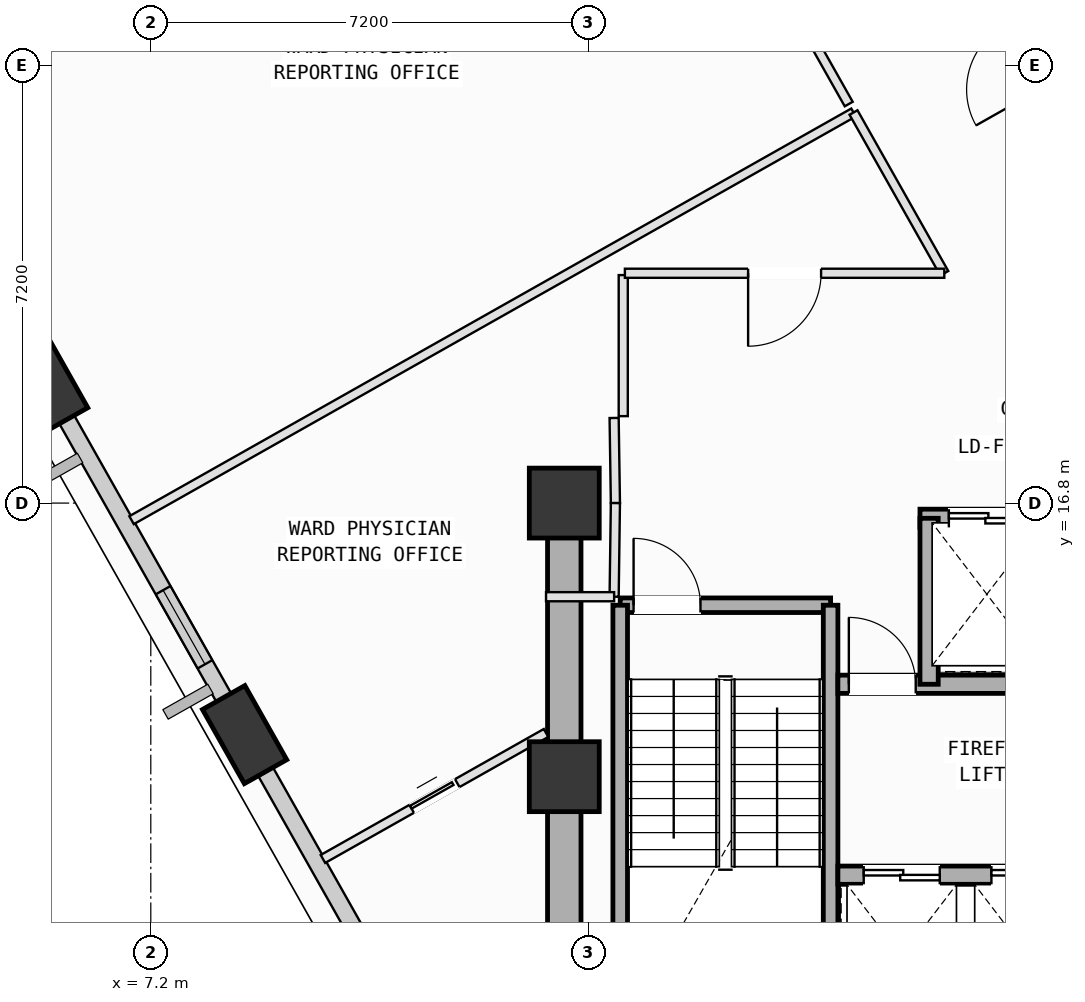
"""IFC4 building model, lengths in metres.
Left out: names, types, materials, properties, quantities, classifications, styles, units other than length and angle.
Written with IfcOpenShell. Run it as: python <this file> out.ifc"""

import sys

from ifc_helpers import new_model, si_unit, direction, frame, frame_2d, origin, origin_2d, place, context, subcontext, project, spatial, rectangle, extrude, element, fill, save


model = new_model("IFC4")
c1 = context("Model", 3, precision=1e-05, world=origin(), true_north=direction((0.0, 1.0)))
c2 = subcontext(c1, "Body", "Model", "MODEL_VIEW")
j1 = project(units=[si_unit("LENGTHUNIT", "METRE"), si_unit("PLANEANGLEUNIT", "RADIAN")], contexts=[c1])
p1 = place(None, origin())
s1 = spatial("IfcSite", under=j1, at=p1, CompositionType="ELEMENT")
p2 = place(p1, origin())
s2 = spatial("IfcBuilding", under=s1, at=p2, CompositionType="ELEMENT")
p3 = place(p2, frame((0.0, 0.0, 149.8)))
s3 = spatial("IfcBuildingStorey", under=s2, at=p3, CompositionType="ELEMENT", Elevation=149.8)
for number, where, z_axis, x_axis in (
    (1, (14.0, 12.3, 0.0), (0.0, 0.0, 1.0), (1.0, 0.0, 0.0)),
    (2, (14.0, 16.8, 0.0), (0.0, 0.0, 1.0), (1.0, 0.0, 0.0)),
):
    element("IfcColumn", number, at=place(p3, frame(where, z_axis=z_axis, x_axis=x_axis)), inside=s3, PredefinedType="COLUMN", context=c2, shape_type="SweptSolid", body=[
        extrude(rectangle(XDim=1.15, YDim=1.15, at=origin_2d()), origin(), (0.0, 0.0, 1.0), 4.0),
    ])
p4 = place(p3, frame((5.471, 18.781, 0.098), z_axis=(0.025670958189, -0.115612547775, 0.992962607908), x_axis=(-0.667400379772, 0.737524132822, 0.103125586472)))
e3 = element("IfcColumn", 3, at=p4, inside=s3, PredefinedType="COLUMN", context=c2, shape_type="SweptSolid", body=[
    extrude(rectangle(XDim=1.4, YDim=0.8, at=origin_2d()), origin(), (0.0, 0.0, 1.0), 3.928),
])
p5 = place(p3, frame((8.743, 12.992, 0.094), z_axis=(0.04945429726, -0.101952891713, 0.993559198213), x_axis=(-0.819960830844, 0.563851045212, 0.098672360339)))
e4 = element("IfcColumn", 4, at=p5, inside=s3, PredefinedType="COLUMN", context=c2, shape_type="SweptSolid", body=[
    extrude(rectangle(XDim=1.4, YDim=0.8, at=origin_2d()), origin(), (0.0, 0.0, 1.0), 3.93),
])
p6 = place(p3, frame((8.606, 13.236, 0.0), z_axis=(0.0, 0.0, 1.0), x_axis=(-0.491646579906, 0.870794832591, 0.0)))
e5 = element("IfcWall", 5, at=p6, inside=s3, PredefinedType="SOLIDWALL", context=c2, shape_type="SweptSolid", body=[
    extrude(rectangle(XDim=5.662, YDim=0.28, at=frame_2d((2.831, 0.0))), origin(), (0.0, 0.0, 1.0), 3.165),
])
p7 = place(p6, frame((1.048, 0.0, 0.75)))
e6 = element("IfcOpeningElement", 6, at=p7, cuts=e5, PredefinedType="OPENING", context=c2, shape_type="SweptSolid", body=[
    extrude(rectangle(XDim=1.4, YDim=1.85, at=frame_2d((0.7, 0.925))), frame((0.0, 0.15, 0.0), z_axis=(0.0, -1.0, 0.0), x_axis=(1.0, 0.0, 0.0)), (0.0, 0.0, 1.0), 0.3),
])
p8 = place(p3, frame((12.713, 5.962, 0.0), z_axis=(0.0, 0.0, 1.0), x_axis=(-0.491677941707, 0.870777125123, 0.0)))
e7 = element("IfcWall", 7, at=p8, inside=s3, PredefinedType="SOLIDWALL", context=c2, shape_type="SweptSolid", body=[
    extrude(rectangle(XDim=7.36, YDim=0.28, at=frame_2d((3.68, 0.0))), origin(), (0.0, 0.0, 1.0), 3.165),
])
p9 = place(p8, frame((1.825, 0.0, 0.75)))
e8 = element("IfcOpeningElement", 8, at=p9, cuts=e7, PredefinedType="OPENING", context=c2, shape_type="SweptSolid", body=[
    extrude(rectangle(XDim=1.8, YDim=2.05, at=frame_2d((0.9, 1.025))), frame((0.0, 0.15, 0.0), z_axis=(0.0, -1.0, 0.0), x_axis=(1.0, 0.0, 0.0)), (0.0, 0.0, 1.0), 0.3),
])
p10 = place(p3, frame((14.92, 15.12, 0.0), z_axis=(0.0, 0.0, 1.0), x_axis=(1.0, 0.0, 0.0)))
e9 = element("IfcWall", 9, at=p10, inside=s3, PredefinedType="SOLIDWALL", context=c2, shape_type="SweptSolid", body=[
    extrude(rectangle(XDim=3.46, YDim=0.24, at=frame_2d((1.73, 0.0))), origin(), (0.0, 0.0, 1.0), 3.78),
])
p11 = place(p10, frame((0.22, 0.0, 0.0)))
e10 = element("IfcOpeningElement", 10, at=p11, cuts=e9, PredefinedType="OPENING", context=c2, shape_type="SweptSolid", body=[
    extrude(rectangle(XDim=1.1, YDim=2.15, at=frame_2d((0.55, 1.075))), frame((0.0, 0.13, 0.0), z_axis=(0.0, -1.0, 0.0), x_axis=(1.0, 0.0, 0.0)), (0.0, 0.0, 1.0), 0.26),
])
for number, where, z_axis, x_axis in (
    (11, (18.38, 15.12, 0.0), (0.0, 0.0, 1.0), (0.0, -1.0, 0.0)),
    (12, (14.92, 8.075, 0.0), (0.0, 0.0, 1.0), (0.0, 1.0, 0.0)),
):
    element("IfcWall", number, at=place(p3, frame(where, z_axis=z_axis, x_axis=x_axis)), inside=s3, PredefinedType="SOLIDWALL", context=c2, shape_type="SweptSolid", body=[
        extrude(rectangle(XDim=7.045, YDim=0.24, at=frame_2d((3.522, 0.0))), origin(), (0.0, 0.0, 1.0), 3.78),
    ])
p12 = place(p3, frame((14.0, 16.8, 0.0), z_axis=(0.0, 0.0, 1.0), x_axis=(0.0, -1.0, 0.0)))
e13 = element("IfcWall", 13, at=p12, inside=s3, PredefinedType="SHEAR", context=c2, shape_type="SweptSolid", body=[
    extrude(rectangle(XDim=9.0, YDim=0.55, at=frame_2d((4.5, 0.0))), origin(), (0.0, 0.0, 1.0), 3.78),
])
p13 = place(p3, frame((19.85, 16.55, 0.0), z_axis=(0.0, 0.0, 1.0), x_axis=(1.0, 0.0, 0.0)))
e14 = element("IfcWall", 14, at=p13, inside=s3, PredefinedType="SOLIDWALL", context=c2, shape_type="SweptSolid", body=[
    extrude(rectangle(XDim=4.375, YDim=0.3, at=frame_2d((2.188, 0.0))), origin(), (0.0, 0.0, 1.0), 3.78),
])
p14 = place(p13, frame((0.475, 0.0, 0.0)))
e15 = element("IfcOpeningElement", 15, at=p14, cuts=e14, PredefinedType="OPENING", context=c2, shape_type="SweptSolid", body=[
    extrude(rectangle(XDim=1.25, YDim=2.18, at=frame_2d((0.625, 1.09))), frame((0.0, 0.16, 0.0), z_axis=(0.0, -1.0, 0.0), x_axis=(1.0, 0.0, 0.0)), (0.0, 0.0, 1.0), 0.32),
])
p15 = place(p13, frame((2.49, 0.0, 0.0)))
e16 = element("IfcOpeningElement", 16, at=p15, cuts=e14, PredefinedType="OPENING", context=c2, shape_type="SweptSolid", body=[
    extrude(rectangle(XDim=1.02, YDim=2.12, at=frame_2d((0.51, 1.06))), frame((0.0, 0.16, 0.0), z_axis=(0.0, -1.0, 0.0), x_axis=(1.0, 0.0, 0.0)), (0.0, 0.0, 1.0), 0.32),
])
p16 = place(p3, frame((18.5, 10.68, 0.0), z_axis=(0.0, 0.0, 1.0), x_axis=(1.0, 0.0, 0.0)))
e17 = element("IfcWall", 17, at=p16, inside=s3, PredefinedType="SOLIDWALL", context=c2, shape_type="SweptSolid", body=[
    extrude(rectangle(XDim=5.3, YDim=0.3, at=frame_2d((2.65, 0.0))), origin(), (0.0, 0.0, 1.0), 3.78),
])
p17 = place(p16, frame((4.22, 0.0, 0.0)))
e18 = element("IfcOpeningElement", 18, at=p17, cuts=e17, PredefinedType="OPENING", context=c2, shape_type="SweptSolid", body=[
    extrude(rectangle(XDim=0.86, YDim=2.06, at=frame_2d((0.43, 1.03))), frame((0.0, 0.16, 0.0), z_axis=(0.0, -1.0, 0.0), x_axis=(1.0, 0.0, 0.0)), (0.0, 0.0, 1.0), 0.32),
])
p18 = place(p16, frame((0.425, 0.0, 0.0)))
e19 = element("IfcOpeningElement", 19, at=p18, cuts=e17, PredefinedType="OPENING", context=c2, shape_type="SweptSolid", body=[
    extrude(rectangle(XDim=1.25, YDim=2.18, at=frame_2d((0.625, 1.09))), frame((0.0, 0.16, 0.0), z_axis=(0.0, -1.0, 0.0), x_axis=(1.0, 0.0, 0.0)), (0.0, 0.0, 1.0), 0.32),
])
p19 = place(p16, frame((2.525, 0.0, 0.0)))
e20 = element("IfcOpeningElement", 20, at=p19, cuts=e17, PredefinedType="OPENING", context=c2, shape_type="SweptSolid", body=[
    extrude(rectangle(XDim=1.25, YDim=2.18, at=frame_2d((0.625, 1.09))), frame((0.0, 0.16, 0.0), z_axis=(0.0, -1.0, 0.0), x_axis=(1.0, 0.0, 0.0)), (0.0, 0.0, 1.0), 0.32),
])
p20 = place(p3, frame((18.5, 13.82, 0.0), z_axis=(0.0, 0.0, 1.0), x_axis=(1.0, 0.0, 0.0)))
e21 = element("IfcWall", 21, at=p20, inside=s3, PredefinedType="SOLIDWALL", context=c2, shape_type="SweptSolid", body=[
    extrude(rectangle(XDim=5.3, YDim=0.3, at=frame_2d((2.65, 0.0))), origin(), (0.0, 0.0, 1.0), 3.78),
])
p21 = place(p20, frame((0.18, 0.0, 0.0)))
e22 = element("IfcOpeningElement", 22, at=p21, cuts=e21, PredefinedType="OPENING", context=c2, shape_type="SweptSolid", body=[
    extrude(rectangle(XDim=1.1, YDim=2.15, at=frame_2d((0.55, 1.075))), frame((0.0, 0.16, 0.0), z_axis=(0.0, -1.0, 0.0), x_axis=(1.0, 0.0, 0.0)), (0.0, 0.0, 1.0), 0.32),
])
p22 = place(p3, frame((20.0, 13.82, 0.0), z_axis=(0.0, 0.0, 1.0), x_axis=(0.0, 1.0, 0.0)))
e23 = element("IfcWall", 23, at=p22, inside=s3, PredefinedType="SOLIDWALL", context=c2, shape_type="SweptSolid", body=[
    extrude(rectangle(XDim=2.73, YDim=0.3, at=frame_2d((1.365, 0.0))), origin(), (0.0, 0.0, 1.0), 3.78),
])
p23 = place(p3, frame((10.031, 10.947, 0.0), z_axis=(0.0, 0.0, 1.0), x_axis=(0.870738681616, 0.491746020154, 0.0)))
e24 = element("IfcWall", 24, at=p23, inside=s3, PredefinedType="PARTITIONING", context=c2, shape_type="SweptSolid", body=[
    extrude(rectangle(XDim=4.214, YDim=0.15, at=frame_2d((2.107, 0.0))), origin(), (0.0, 0.0, 1.0), 3.78),
])
p24 = place(p23, frame((1.677, 0.0, 0.0)))
e25 = element("IfcOpeningElement", 25, at=p24, cuts=e24, PredefinedType="OPENING", context=c2, shape_type="SweptSolid", body=[
    extrude(rectangle(XDim=0.86, YDim=2.06, at=frame_2d((0.43, 1.03))), frame((0.0, 0.085, 0.0), z_axis=(0.0, -1.0, 0.0), x_axis=(1.0, 0.0, 0.0)), (0.0, 0.0, 1.0), 0.17),
])
p25 = place(p3, frame((14.97, 20.55, 0.0), z_axis=(0.0, 0.0, 1.0), x_axis=(0.0, -1.0, 0.0)))
e26 = element("IfcWall", 26, at=p25, inside=s3, PredefinedType="PARTITIONING", context=c2, shape_type="SweptSolid", body=[
    extrude(rectangle(XDim=2.32, YDim=0.15, at=frame_2d((1.16, 0.0))), origin(), (0.0, 0.0, 1.0), 2.765),
])
p26 = place(p3, frame((14.82, 18.2, 0.0), z_axis=(0.0, 0.0, 1.0), x_axis=(0.01499656939, -0.99988754513, 0.0)))
e27 = element("IfcWall", 27, at=p26, inside=s3, PredefinedType="PARTITIONING", context=c2, shape_type="SweptSolid", body=[
    extrude(rectangle(XDim=1.4, YDim=0.15, at=frame_2d((0.7, 0.0))), origin(), (0.0, 0.0, 1.0), 3.78),
])
p27 = place(p3, frame((14.841, 16.8, 0.0), z_axis=(0.0, 0.0, 1.0), x_axis=(-0.01363221443, -0.999907077048, 0.0)))
e28 = element("IfcWall", 28, at=p27, inside=s3, PredefinedType="PARTITIONING", context=c2, shape_type="SweptSolid", body=[
    extrude(rectangle(XDim=1.54, YDim=0.15, at=frame_2d((0.77, 0.0))), origin(), (0.0, 0.0, 1.0), 3.78),
])
p28 = place(p3, frame((14.82, 15.26, 0.0), z_axis=(0.0, 0.0, 1.0), x_axis=(-1.0, 0.0, 0.0)))
e29 = element("IfcWall", 29, at=p28, inside=s3, PredefinedType="PARTITIONING", context=c2, shape_type="SweptSolid", body=[
    extrude(rectangle(XDim=1.12, YDim=0.15, at=frame_2d((0.56, 0.0))), origin(), (0.0, 0.0, 1.0), 3.78),
])
p29 = place(p3, frame((8.894, 12.259, 0.0), z_axis=(0.0, 0.0, 1.0), x_axis=(-0.491814027266, 0.870700271382, 0.0)))
e30 = element("IfcWall", 30, at=p29, inside=s3, PredefinedType="PARTITIONING", context=c2, shape_type="SweptSolid", body=[
    extrude(rectangle(XDim=0.992, YDim=0.15, at=frame_2d((0.496, 0.0))), origin(), (0.0, 0.0, 1.0), 3.165),
])
p30 = place(p3, frame((6.884, 16.519, 0.0), z_axis=(0.0, 0.0, 1.0), x_axis=(0.870744187076, 0.491736271464, 0.0)))
e31 = element("IfcWall", 31, at=p30, inside=s3, PredefinedType="PARTITIONING", context=c2, shape_type="SweptSolid", body=[
    extrude(rectangle(XDim=13.635, YDim=0.15, at=frame_2d((6.818, 0.0))), origin(), (0.0, 0.0, 1.0), 3.78),
])
p31 = place(p3, frame((18.757, 23.224, 0.0), z_axis=(0.0, 0.0, 1.0), x_axis=(0.491673041497, -0.870779891973, 0.0)))
e32 = element("IfcWall", 32, at=p31, inside=s3, PredefinedType="PARTITIONING", context=c2, shape_type="SweptSolid", body=[
    extrude(rectangle(XDim=3.036, YDim=0.15, at=frame_2d((1.518, 0.0))), origin(), (0.0, 0.0, 1.0), 3.78),
])
p32 = place(p3, frame((20.25, 20.58, 0.0), z_axis=(0.0, 0.0, 1.0), x_axis=(-1.0, 0.0, 0.0)))
e33 = element("IfcWall", 33, at=p32, inside=s3, PredefinedType="PARTITIONING", context=c2, shape_type="SweptSolid", body=[
    extrude(rectangle(XDim=5.253, YDim=0.15, at=frame_2d((2.626, 0.0))), origin(), (0.0, 0.0, 1.0), 3.78),
])
p33 = place(p32, frame((2.027, 0.0, 0.0)))
e34 = element("IfcOpeningElement", 34, at=p33, cuts=e33, PredefinedType="OPENING", context=c2, shape_type="SweptSolid", body=[
    extrude(rectangle(XDim=1.2, YDim=2.15, at=frame_2d((0.6, 1.075))), frame((0.0, 0.085, 0.0), z_axis=(0.0, -1.0, 0.0), x_axis=(1.0, 0.0, 0.0)), (0.0, 0.0, 1.0), 0.17),
])
p34 = place(p3, frame((14.234, 31.235, 0.0), z_axis=(0.0, 0.0, 1.0), x_axis=(0.491609563099, -0.870815731065, 0.0)))
e35 = element("IfcWall", 35, at=p34, inside=s3, PredefinedType="PARTITIONING", context=c2, shape_type="SweptSolid", body=[
    extrude(rectangle(XDim=9.04, YDim=0.15, at=frame_2d((4.52, 0.0))), origin(), (0.0, 0.0, 1.0), 3.78),
])
p35 = place(p34, frame((3.92, 0.0, 0.0)))
e36 = element("IfcOpeningElement", 36, at=p35, cuts=e35, PredefinedType="OPENING", context=c2, shape_type="SweptSolid", body=[
    extrude(rectangle(XDim=1.2, YDim=2.15, at=frame_2d((0.6, 1.075))), frame((0.0, 0.085, 0.0), z_axis=(0.0, -1.0, 0.0), x_axis=(1.0, 0.0, 0.0)), (0.0, 0.0, 1.0), 0.17),
])
p36 = place(p3, frame((5.622, 18.053, 0.0), z_axis=(0.0, 0.0, 1.0), x_axis=(-0.491557910724, 0.870844888832, 0.0)))
e37 = element("IfcWall", 37, at=p36, inside=s3, PredefinedType="PARTITIONING", context=c2, shape_type="SweptSolid", body=[
    extrude(rectangle(XDim=0.983, YDim=0.15, at=frame_2d((0.491, 0.0))), origin(), (0.0, 0.0, 1.0), 3.165),
])
p37 = place(p3, frame((23.041, 21.433, 0.0), z_axis=(0.0, 0.0, 1.0), x_axis=(-0.49170838603, 0.870759934258, 0.0)))
e38 = element("IfcWall", 38, at=p37, inside=s3, PredefinedType="PARTITIONING", context=c2, shape_type="SweptSolid", body=[
    extrude(rectangle(XDim=6.181, YDim=0.15, at=frame_2d((3.09, 0.0))), origin(), (0.0, 0.0, 1.0), 3.78),
])
p38 = place(p37, frame((2.49, 0.0, 0.0)))
e39 = element("IfcOpeningElement", 39, at=p38, cuts=e38, PredefinedType="OPENING", context=c2, shape_type="SweptSolid", body=[
    extrude(rectangle(XDim=1.2, YDim=2.15, at=frame_2d((0.6, 1.075))), frame((0.0, 0.085, 0.0), z_axis=(0.0, -1.0, 0.0), x_axis=(1.0, 0.0, 0.0)), (0.0, 0.0, 1.0), 0.17),
])
p39 = place(p7, origin())
e40 = element("IfcWindow", 40, at=p39, inside=s3, PartitioningType="SINGLE_PANEL", PredefinedType="WINDOW", context=c2, shape_type="SweptSolid", body=[
    extrude(rectangle(XDim=1.4, YDim=1.85, at=frame_2d((0.7, 0.925))), frame((0.0, 0.03, 0.0), z_axis=(0.0, -1.0, 0.0), x_axis=(1.0, 0.0, 0.0)), (0.0, 0.0, 1.0), 0.06),
])
fill(e6, e40)
p40 = place(p11, origin())
e41 = element("IfcDoor", 41, at=p40, inside=s3, OperationType="SINGLE_SWING_LEFT", PredefinedType="DOOR", context=c2, shape_type="SweptSolid", body=[
    extrude(rectangle(XDim=1.1, YDim=2.15, at=frame_2d((0.55, 1.075))), frame((0.0, 0.025, 0.0), z_axis=(0.0, -1.0, 0.0), x_axis=(1.0, 0.0, 0.0)), (0.0, 0.0, 1.0), 0.05),
])
fill(e10, e41)
p41 = place(p21, origin())
e42 = element("IfcDoor", 42, at=p41, inside=s3, OperationType="SINGLE_SWING_LEFT", PredefinedType="DOOR", context=c2, shape_type="SweptSolid", body=[
    extrude(rectangle(XDim=1.1, YDim=2.15, at=frame_2d((0.55, 1.075))), frame((0.0, 0.025, 0.0), z_axis=(0.0, -1.0, 0.0), x_axis=(1.0, 0.0, 0.0)), (0.0, 0.0, 1.0), 0.05),
])
fill(e22, e42)
p42 = place(p18, origin())
e43 = element("IfcDoor", 43, at=p42, inside=s3, OperationType="DOUBLE_DOOR_SLIDING", PredefinedType="DOOR", context=c2, shape_type="SweptSolid", body=[
    extrude(rectangle(XDim=1.25, YDim=2.18, at=frame_2d((0.625, 1.09))), frame((0.0, 0.025, 0.0), z_axis=(0.0, -1.0, 0.0), x_axis=(1.0, 0.0, 0.0)), (0.0, 0.0, 1.0), 0.05),
])
fill(e19, e43)
p43 = place(p19, origin())
e44 = element("IfcDoor", 44, at=p43, inside=s3, OperationType="DOUBLE_DOOR_SLIDING", PredefinedType="DOOR", context=c2, shape_type="SweptSolid", body=[
    extrude(rectangle(XDim=1.25, YDim=2.18, at=frame_2d((0.625, 1.09))), frame((0.0, 0.025, 0.0), z_axis=(0.0, -1.0, 0.0), x_axis=(1.0, 0.0, 0.0)), (0.0, 0.0, 1.0), 0.05),
])
fill(e20, e44)
p44 = place(p14, origin())
e45 = element("IfcDoor", 45, at=p44, inside=s3, OperationType="DOUBLE_DOOR_SLIDING", PredefinedType="DOOR", context=c2, shape_type="SweptSolid", body=[
    extrude(rectangle(XDim=1.25, YDim=2.18, at=frame_2d((0.625, 1.09))), frame((0.0, 0.025, 0.0), z_axis=(0.0, -1.0, 0.0), x_axis=(1.0, 0.0, 0.0)), (0.0, 0.0, 1.0), 0.05),
])
fill(e15, e45)
p45 = place(p33, origin())
e46 = element("IfcDoor", 46, at=p45, inside=s3, OperationType="SINGLE_SWING_RIGHT", PredefinedType="DOOR", context=c2, shape_type="SweptSolid", body=[
    extrude(rectangle(XDim=1.2, YDim=2.15, at=frame_2d((0.6, 1.075))), frame((0.0, 0.025, 0.0), z_axis=(0.0, -1.0, 0.0), x_axis=(1.0, 0.0, 0.0)), (0.0, 0.0, 1.0), 0.05),
])
fill(e34, e46)
p46 = place(p38, origin())
e47 = element("IfcDoor", 47, at=p46, inside=s3, OperationType="SINGLE_SWING_LEFT", PredefinedType="DOOR", context=c2, shape_type="SweptSolid", body=[
    extrude(rectangle(XDim=1.2, YDim=2.15, at=frame_2d((0.6, 1.075))), frame((0.0, 0.025, 0.0), z_axis=(0.0, -1.0, 0.0), x_axis=(1.0, 0.0, 0.0)), (0.0, 0.0, 1.0), 0.05),
])
fill(e39, e47)
p47 = place(p24, origin())
e48 = element("IfcDoor", 48, at=p47, inside=s3, OperationType="SLIDING_TO_LEFT", PredefinedType="DOOR", context=c2, shape_type="SweptSolid", body=[
    extrude(rectangle(XDim=0.86, YDim=2.06, at=frame_2d((0.43, 1.03))), frame((0.0, 0.025, 0.0), z_axis=(0.0, -1.0, 0.0), x_axis=(1.0, 0.0, 0.0)), (0.0, 0.0, 1.0), 0.05),
])
fill(e25, e48)
save(model, sys.argv[1])
